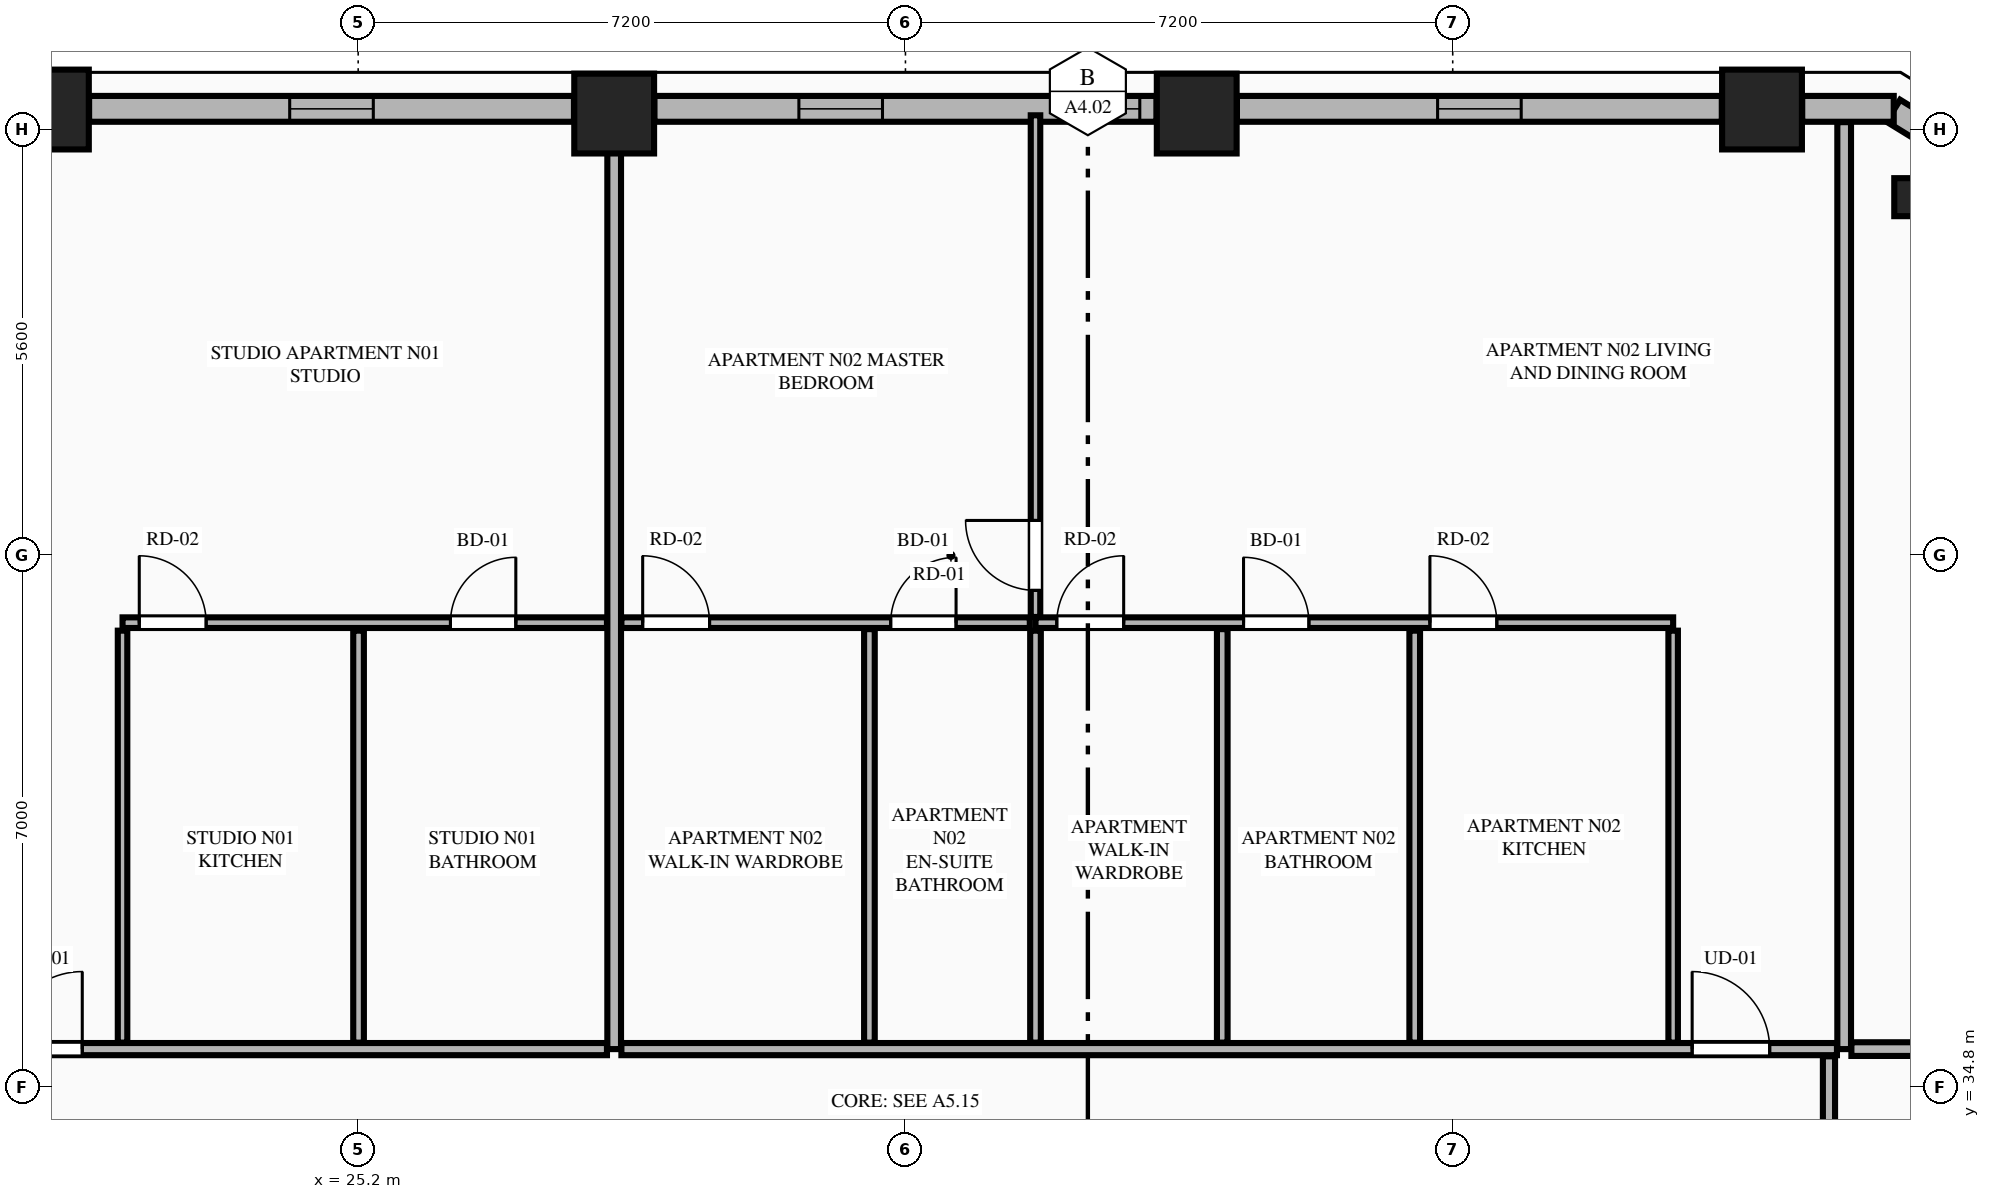
"""IFC4 building model, lengths in metres.
Left out: names, types, materials, properties, quantities, classifications, styles, units other than length and angle.
Written with IfcOpenShell. Run it as: python <this file> out.ifc"""

import sys

from ifc_helpers import new_model, si_unit, direction, frame, frame_2d, origin, origin_2d, place, context, subcontext, project, spatial, rectangle, extrude, element, fill, save


model = new_model("IFC4")
c1 = context("Model", 3, precision=1e-05, world=origin(), true_north=direction((0.0, 1.0)))
c2 = subcontext(c1, "Body", "Model", "MODEL_VIEW")
j1 = project(units=[si_unit("LENGTHUNIT", "METRE"), si_unit("PLANEANGLEUNIT", "RADIAN")], contexts=[c1])
p1 = place(None, origin())
s1 = spatial("IfcSite", under=j1, at=p1, CompositionType="ELEMENT")
p2 = place(p1, origin())
s2 = spatial("IfcBuilding", under=s1, at=p2, CompositionType="ELEMENT")
p3 = place(p2, frame((0.0, 0.0, 101.95)))
s3 = spatial("IfcBuildingStorey", under=s2, at=p3, CompositionType="ELEMENT", Elevation=101.95)
for number, where, z_axis, x_axis in (
    (1, (43.669, 47.661, 0.0), (0.0, 0.0, 1.0), (1.0, 0.0, 0.0)),
    (2, (36.232, 47.608, 0.0), (0.0, 0.0, 1.0), (1.0, 0.0, 0.0)),
    (3, (28.568, 47.608, 0.0), (0.0, 0.0, 1.0), (1.0, 0.0, 0.0)),
    (4, (21.131, 47.661, 0.0), (0.0, 0.0, 1.0), (1.0, 0.0, 0.0)),
):
    element("IfcColumn", number, at=place(p3, frame(where, z_axis=z_axis, x_axis=x_axis)), inside=s3, PredefinedType="COLUMN", context=c2, shape_type="SweptSolid", body=[
        extrude(rectangle(XDim=1.05, YDim=1.05, at=origin_2d()), origin(), (0.0, 0.0, 1.0), 3.55),
    ])
p4 = place(p3, frame((45.659, 46.508, 0.0), z_axis=(0.0, 0.0, 1.0), x_axis=(-0.865160173452, 0.501495637342, 0.0)))
e5 = element("IfcColumn", 5, at=p4, inside=s3, PredefinedType="PILASTER", context=c2, shape_type="SweptSolid", body=[
    extrude(rectangle(XDim=0.5, YDim=0.35, at=origin_2d()), origin(), (0.0, 0.0, 1.0), 3.55),
])
p5 = place(p3, frame((46.971, 46.677, 0.0), z_axis=(0.0, 0.0, 1.0), x_axis=(-0.851798915137, 0.523868884523, 0.0)))
e6 = element("IfcWall", 6, at=p5, inside=s3, PredefinedType="STANDARD", context=c2, shape_type="SweptSolid", body=[
    extrude(rectangle(XDim=1.848, YDim=0.34, at=frame_2d((0.924, 0.0))), origin(), (0.0, 0.0, 1.0), 3.34),
])
p6 = place(p3, frame((45.402, 47.67, 0.0), z_axis=(0.0, 0.0, 1.0), x_axis=(-1.0, 0.0, 0.0)))
e7 = element("IfcWall", 7, at=p6, inside=s3, PredefinedType="STANDARD", context=c2, shape_type="SweptSolid", body=[
    extrude(rectangle(XDim=1.204, YDim=0.34, at=frame_2d((0.602, 0.0))), origin(), (0.0, 0.0, 1.0), 3.34),
])
p7 = place(p3, frame((43.14, 47.67, 0.0), z_axis=(0.0, 0.0, 1.0), x_axis=(-1.0, 0.0, 0.0)))
e8 = element("IfcWall", 8, at=p7, inside=s3, PredefinedType="STANDARD", context=c2, shape_type="SweptSolid", body=[
    extrude(rectangle(XDim=6.379, YDim=0.34, at=frame_2d((3.189, 0.0))), origin(), (0.0, 0.0, 1.0), 2.797),
])
p8 = place(p7, frame((2.639, 0.0, 0.75)))
e9 = element("IfcOpeningElement", 9, at=p8, cuts=e8, PredefinedType="OPENING", context=c2, shape_type="SweptSolid", body=[
    extrude(rectangle(XDim=1.1, YDim=1.897, at=frame_2d((0.55, 0.948))), frame((0.0, 0.18, 0.0), z_axis=(0.0, -1.0, 0.0), x_axis=(1.0, 0.0, 0.0)), (0.0, 0.0, 1.0), 0.36),
])
p9 = place(p3, frame((35.703, 47.67, 0.0), z_axis=(0.0, 0.0, 1.0), x_axis=(-1.0, 0.0, 0.0)))
e10 = element("IfcWall", 10, at=p9, inside=s3, PredefinedType="STANDARD", context=c2, shape_type="SweptSolid", body=[
    extrude(rectangle(XDim=6.606, YDim=0.34, at=frame_2d((3.303, 0.0))), origin(), (0.0, 0.0, 1.0), 2.797),
])
p10 = place(p9, frame((0.22, 0.0, 0.75)))
e11 = element("IfcOpeningElement", 11, at=p10, cuts=e10, PredefinedType="OPENING", context=c2, shape_type="SweptSolid", body=[
    extrude(rectangle(XDim=1.04, YDim=1.897, at=frame_2d((0.52, 0.948))), frame((0.0, 0.18, 0.0), z_axis=(0.0, -1.0, 0.0), x_axis=(1.0, 0.0, 0.0)), (0.0, 0.0, 1.0), 0.36),
])
p11 = place(p9, frame((3.605, 0.0, 0.75)))
e12 = element("IfcOpeningElement", 12, at=p11, cuts=e10, PredefinedType="OPENING", context=c2, shape_type="SweptSolid", body=[
    extrude(rectangle(XDim=1.1, YDim=1.897, at=frame_2d((0.55, 0.948))), frame((0.0, 0.18, 0.0), z_axis=(0.0, -1.0, 0.0), x_axis=(1.0, 0.0, 0.0)), (0.0, 0.0, 1.0), 0.36),
])
p12 = place(p3, frame((28.039, 47.67, 0.0), z_axis=(0.0, 0.0, 1.0), x_axis=(-1.0, 0.0, 0.0)))
e13 = element("IfcWall", 13, at=p12, inside=s3, PredefinedType="STANDARD", context=c2, shape_type="SweptSolid", body=[
    extrude(rectangle(XDim=6.379, YDim=0.34, at=frame_2d((3.189, 0.0))), origin(), (0.0, 0.0, 1.0), 2.797),
])
p13 = place(p12, frame((2.64, 0.0, 0.75)))
e14 = element("IfcOpeningElement", 14, at=p13, cuts=e13, PredefinedType="OPENING", context=c2, shape_type="SweptSolid", body=[
    extrude(rectangle(XDim=1.1, YDim=1.897, at=frame_2d((0.55, 0.948))), frame((0.0, 0.18, 0.0), z_axis=(0.0, -1.0, 0.0), x_axis=(1.0, 0.0, 0.0)), (0.0, 0.0, 1.0), 0.36),
])
p14 = place(p3, frame((28.568, 35.3, 0.0), z_axis=(0.0, 0.0, 1.0), x_axis=(0.0, 1.0, 0.0)))
e15 = element("IfcWall", 15, at=p14, inside=s3, PredefinedType="PARTITIONING", context=c2, shape_type="SweptSolid", body=[
    extrude(rectangle(XDim=12.195, YDim=0.18, at=frame_2d((6.098, 0.0))), origin(), (0.0, 0.0, 1.0), 2.722),
])
p15 = place(p3, frame((44.75, 35.3, 0.0), z_axis=(0.0, 0.0, 1.0), x_axis=(0.0, 1.0, 0.0)))
e16 = element("IfcWall", 16, at=p15, inside=s3, PredefinedType="PARTITIONING", context=c2, shape_type="SweptSolid", body=[
    extrude(rectangle(XDim=12.195, YDim=0.18, at=frame_2d((6.098, 0.0))), origin(), (0.0, 0.0, 1.0), 3.34),
])
p16 = place(p3, frame((20.145, 35.3, 0.0), z_axis=(0.0, 0.0, 1.0), x_axis=(1.0, 0.0, 0.0)))
e17 = element("IfcWall", 17, at=p16, inside=s3, PredefinedType="PARTITIONING", context=c2, shape_type="SweptSolid", body=[
    extrude(rectangle(XDim=8.328, YDim=0.16, at=frame_2d((4.164, 0.0))), origin(), (0.0, 0.0, 1.0), 3.34),
])
p17 = place(p16, frame((0.405, 0.0, 0.0)))
e18 = element("IfcOpeningElement", 18, at=p17, cuts=e17, PredefinedType="OPENING", context=c2, shape_type="SweptSolid", body=[
    extrude(rectangle(XDim=1.02, YDim=2.25, at=frame_2d((0.51, 1.125))), frame((0.0, 0.09, 0.0), z_axis=(0.0, -1.0, 0.0), x_axis=(1.0, 0.0, 0.0)), (0.0, 0.0, 1.0), 0.18),
])
p18 = place(p3, frame((22.1, 35.385, 0.0), z_axis=(0.0, 0.0, 1.0), x_axis=(0.0, 1.0, 0.0)))
e19 = element("IfcWall", 19, at=p18, inside=s3, PredefinedType="PARTITIONING", context=c2, shape_type="SweptSolid", body=[
    extrude(rectangle(XDim=5.42, YDim=0.125, at=frame_2d((2.71, 0.0))), origin(), (0.0, 0.0, 1.0), 2.722),
])
p19 = place(p3, frame((22.1, 40.91, 0.0), z_axis=(0.0, 0.0, 1.0), x_axis=(1.0, 0.0, 0.0)))
e20 = element("IfcWall", 20, at=p19, inside=s3, PredefinedType="PLUMBINGWALL", context=c2, shape_type="SweptSolid", body=[
    extrude(rectangle(XDim=6.373, YDim=0.14, at=frame_2d((3.187, 0.0))), origin(), (0.0, 0.0, 1.0), 3.34),
])
p20 = place(p19, frame((4.314, 0.0, 0.0)))
e21 = element("IfcOpeningElement", 21, at=p20, cuts=e20, PredefinedType="OPENING", context=c2, shape_type="SweptSolid", body=[
    extrude(rectangle(XDim=0.86, YDim=2.1, at=frame_2d((0.43, 1.05))), frame((0.0, 0.08, 0.0), z_axis=(0.0, -1.0, 0.0), x_axis=(1.0, 0.0, 0.0)), (0.0, 0.0, 1.0), 0.16),
])
p21 = place(p19, frame((0.22, 0.0, 0.0)))
e22 = element("IfcOpeningElement", 22, at=p21, cuts=e20, PredefinedType="OPENING", context=c2, shape_type="SweptSolid", body=[
    extrude(rectangle(XDim=0.88, YDim=2.15, at=frame_2d((0.44, 1.075))), frame((0.0, 0.08, 0.0), z_axis=(0.0, -1.0, 0.0), x_axis=(1.0, 0.0, 0.0)), (0.0, 0.0, 1.0), 0.16),
])
p22 = place(p3, frame((25.205, 35.385, 0.0), z_axis=(0.0, 0.0, 1.0), x_axis=(0.0, 1.0, 0.0)))
e23 = element("IfcWall", 23, at=p22, inside=s3, PredefinedType="PLUMBINGWALL", context=c2, shape_type="SweptSolid", body=[
    extrude(rectangle(XDim=5.42, YDim=0.14, at=frame_2d((2.71, 0.0))), origin(), (0.0, 0.0, 1.0), 3.34),
])
p23 = place(p3, frame((28.663, 35.3, 0.0), z_axis=(0.0, 0.0, 1.0), x_axis=(1.0, 0.0, 0.0)))
e24 = element("IfcWall", 24, at=p23, inside=s3, PredefinedType="PARTITIONING", context=c2, shape_type="SweptSolid", body=[
    extrude(rectangle(XDim=15.992, YDim=0.16, at=frame_2d((7.996, 0.0))), origin(), (0.0, 0.0, 1.0), 3.34),
])
p24 = place(p23, frame((14.087, 0.0, 0.0)))
e25 = element("IfcOpeningElement", 25, at=p24, cuts=e24, PredefinedType="OPENING", context=c2, shape_type="SweptSolid", body=[
    extrude(rectangle(XDim=1.02, YDim=2.25, at=frame_2d((0.51, 1.125))), frame((0.0, 0.09, 0.0), z_axis=(0.0, -1.0, 0.0), x_axis=(1.0, 0.0, 0.0)), (0.0, 0.0, 1.0), 0.18),
])
p25 = place(p3, frame((42.5, 35.385, 0.0), z_axis=(0.0, 0.0, 1.0), x_axis=(0.0, 1.0, 0.0)))
e26 = element("IfcWall", 26, at=p25, inside=s3, PredefinedType="PARTITIONING", context=c2, shape_type="SweptSolid", body=[
    extrude(rectangle(XDim=5.42, YDim=0.125, at=frame_2d((2.71, 0.0))), origin(), (0.0, 0.0, 1.0), 2.722),
])
p26 = place(p3, frame((34.111, 40.91, 0.0), z_axis=(0.0, 0.0, 1.0), x_axis=(1.0, 0.0, 0.0)))
e27 = element("IfcWall", 27, at=p26, inside=s3, PredefinedType="PLUMBINGWALL", context=c2, shape_type="SweptSolid", body=[
    extrude(rectangle(XDim=8.389, YDim=0.14, at=frame_2d((4.194, 0.0))), origin(), (0.0, 0.0, 1.0), 3.34),
])
p27 = place(p26, frame((0.28, 0.0, 0.0)))
e28 = element("IfcOpeningElement", 28, at=p27, cuts=e27, PredefinedType="OPENING", context=c2, shape_type="SweptSolid", body=[
    extrude(rectangle(XDim=0.88, YDim=2.15, at=frame_2d((0.44, 1.075))), frame((0.0, 0.08, 0.0), z_axis=(0.0, -1.0, 0.0), x_axis=(1.0, 0.0, 0.0)), (0.0, 0.0, 1.0), 0.16),
])
p28 = place(p26, frame((2.737, 0.0, 0.0)))
e29 = element("IfcOpeningElement", 29, at=p28, cuts=e27, PredefinedType="OPENING", context=c2, shape_type="SweptSolid", body=[
    extrude(rectangle(XDim=0.86, YDim=2.1, at=frame_2d((0.43, 1.05))), frame((0.0, 0.08, 0.0), z_axis=(0.0, -1.0, 0.0), x_axis=(1.0, 0.0, 0.0)), (0.0, 0.0, 1.0), 0.16),
])
p29 = place(p26, frame((5.189, 0.0, 0.0)))
e30 = element("IfcOpeningElement", 30, at=p29, cuts=e27, PredefinedType="OPENING", context=c2, shape_type="SweptSolid", body=[
    extrude(rectangle(XDim=0.88, YDim=2.15, at=frame_2d((0.44, 1.075))), frame((0.0, 0.08, 0.0), z_axis=(0.0, -1.0, 0.0), x_axis=(1.0, 0.0, 0.0)), (0.0, 0.0, 1.0), 0.16),
])
p30 = place(p3, frame((28.663, 40.91, 0.0), z_axis=(0.0, 0.0, 1.0), x_axis=(1.0, 0.0, 0.0)))
e31 = element("IfcWall", 31, at=p30, inside=s3, PredefinedType="PLUMBINGWALL", context=c2, shape_type="SweptSolid", body=[
    extrude(rectangle(XDim=5.373, YDim=0.14, at=frame_2d((2.687, 0.0))), origin(), (0.0, 0.0, 1.0), 3.34),
])
p31 = place(p30, frame((0.28, 0.0, 0.0)))
e32 = element("IfcOpeningElement", 32, at=p31, cuts=e31, PredefinedType="OPENING", context=c2, shape_type="SweptSolid", body=[
    extrude(rectangle(XDim=0.88, YDim=2.15, at=frame_2d((0.44, 1.075))), frame((0.0, 0.08, 0.0), z_axis=(0.0, -1.0, 0.0), x_axis=(1.0, 0.0, 0.0)), (0.0, 0.0, 1.0), 0.16),
])
p32 = place(p30, frame((3.543, 0.0, 0.0)))
e33 = element("IfcOpeningElement", 33, at=p32, cuts=e31, PredefinedType="OPENING", context=c2, shape_type="SweptSolid", body=[
    extrude(rectangle(XDim=0.86, YDim=2.1, at=frame_2d((0.43, 1.05))), frame((0.0, 0.08, 0.0), z_axis=(0.0, -1.0, 0.0), x_axis=(1.0, 0.0, 0.0)), (0.0, 0.0, 1.0), 0.16),
])
for number, where, z_axis, x_axis in (
    (34, (39.1, 35.385, 0.0), (0.0, 0.0, 1.0), (0.0, 1.0, 0.0)),
    (35, (34.111, 35.385, 0.0), (0.0, 0.0, 1.0), (0.0, 1.0, 0.0)),
):
    element("IfcWall", number, at=place(p3, frame(where, z_axis=z_axis, x_axis=x_axis)), inside=s3, PredefinedType="PLUMBINGWALL", context=c2, shape_type="SweptSolid", body=[
        extrude(rectangle(XDim=5.42, YDim=0.14, at=frame_2d((2.71, 0.0))), origin(), (0.0, 0.0, 1.0), 3.34),
    ])
p33 = place(p3, frame((34.111, 40.985, 0.0), z_axis=(0.0, 0.0, 1.0), x_axis=(0.0, 1.0, 0.0)))
e36 = element("IfcWall", 36, at=p33, inside=s3, PredefinedType="PARTITIONING", context=c2, shape_type="SweptSolid", body=[
    extrude(rectangle(XDim=6.6, YDim=0.125, at=frame_2d((3.3, 0.0))), origin(), (0.0, 0.0, 1.0), 3.34),
])
p34 = place(p33, frame((0.35, 0.0, 0.0)))
e37 = element("IfcOpeningElement", 37, at=p34, cuts=e36, PredefinedType="OPENING", context=c2, shape_type="SweptSolid", body=[
    extrude(rectangle(XDim=0.92, YDim=2.15, at=frame_2d((0.46, 1.075))), frame((0.0, 0.073, 0.0), z_axis=(0.0, -1.0, 0.0), x_axis=(1.0, 0.0, 0.0)), (0.0, 0.0, 1.0), 0.145),
])
for number, where, z_axis, x_axis in (
    (38, (36.568, 35.385, 0.0), (0.0, 0.0, 1.0), (0.0, 1.0, 0.0)),
    (39, (31.926, 35.385, 0.0), (0.0, 0.0, 1.0), (0.0, 1.0, 0.0)),
):
    element("IfcWall", number, at=place(p3, frame(where, z_axis=z_axis, x_axis=x_axis)), inside=s3, PredefinedType="PLUMBINGWALL", context=c2, shape_type="SweptSolid", body=[
        extrude(rectangle(XDim=5.44, YDim=0.14, at=frame_2d((2.72, 0.0))), origin(), (0.0, 0.0, 1.0), 3.34),
    ])
p35 = place(p3, frame((44.845, 35.3, 0.0), z_axis=(0.0, 0.0, 1.0), x_axis=(1.0, 0.0, 0.0)))
e40 = element("IfcWall", 40, at=p35, inside=s3, PredefinedType="PARTITIONING", context=c2, shape_type="SweptSolid", body=[
    extrude(rectangle(XDim=7.669, YDim=0.18, at=frame_2d((3.834, 0.0))), origin(), (0.0, 0.0, 1.0), 3.34),
])
p36 = place(p3, frame((44.55, 26.371, 0.0), z_axis=(0.0, 0.0, 1.0), x_axis=(0.0, 1.0, 0.0)))
e41 = element("IfcWall", 41, at=p36, inside=s3, PredefinedType="PARTITIONING", context=c2, shape_type="SweptSolid", body=[
    extrude(rectangle(XDim=8.834, YDim=0.16, at=frame_2d((4.417, 0.0))), origin(), (0.0, 0.0, 1.0), 3.34),
])
p37 = place(p36, frame((0.45, 0.0, 0.0)))
e42 = element("IfcOpeningElement", 42, at=p37, cuts=e41, PredefinedType="OPENING", context=c2, shape_type="SweptSolid", body=[
    extrude(rectangle(XDim=1.02, YDim=2.25, at=frame_2d((0.51, 1.125))), frame((0.0, 0.09, 0.0), z_axis=(0.0, -1.0, 0.0), x_axis=(1.0, 0.0, 0.0)), (0.0, 0.0, 1.0), 0.18),
])
p38 = place(p8, origin())
e43 = element("IfcWindow", 43, at=p38, inside=s3, PartitioningType="SINGLE_PANEL", PredefinedType="WINDOW", context=c2, shape_type="SweptSolid", body=[
    extrude(rectangle(XDim=1.1, YDim=1.897, at=frame_2d((0.55, 0.948))), frame((0.0, 0.03, 0.0), z_axis=(0.0, -1.0, 0.0), x_axis=(1.0, 0.0, 0.0)), (0.0, 0.0, 1.0), 0.06),
])
fill(e9, e43)
p39 = place(p10, origin())
e44 = element("IfcWindow", 44, at=p39, inside=s3, PartitioningType="SINGLE_PANEL", PredefinedType="WINDOW", context=c2, shape_type="SweptSolid", body=[
    extrude(rectangle(XDim=1.04, YDim=1.897, at=frame_2d((0.52, 0.948))), frame((0.0, 0.03, 0.0), z_axis=(0.0, -1.0, 0.0), x_axis=(1.0, 0.0, 0.0)), (0.0, 0.0, 1.0), 0.06),
])
fill(e11, e44)
p40 = place(p13, origin())
e45 = element("IfcWindow", 45, at=p40, inside=s3, PartitioningType="SINGLE_PANEL", PredefinedType="WINDOW", context=c2, shape_type="SweptSolid", body=[
    extrude(rectangle(XDim=1.1, YDim=1.897, at=frame_2d((0.55, 0.948))), frame((0.0, 0.03, 0.0), z_axis=(0.0, -1.0, 0.0), x_axis=(1.0, 0.0, 0.0)), (0.0, 0.0, 1.0), 0.06),
])
fill(e14, e45)
p41 = place(p20, origin())
e46 = element("IfcDoor", 46, at=p41, inside=s3, OperationType="SINGLE_SWING_RIGHT", PredefinedType="DOOR", context=c2, shape_type="SweptSolid", body=[
    extrude(rectangle(XDim=0.86, YDim=2.1, at=frame_2d((0.43, 1.05))), frame((0.0, 0.025, 0.0), z_axis=(0.0, -1.0, 0.0), x_axis=(1.0, 0.0, 0.0)), (0.0, 0.0, 1.0), 0.05),
])
fill(e21, e46)
p42 = place(p17, origin())
e47 = element("IfcDoor", 47, at=p42, inside=s3, OperationType="SINGLE_SWING_RIGHT", PredefinedType="DOOR", context=c2, shape_type="SweptSolid", body=[
    extrude(rectangle(XDim=1.02, YDim=2.25, at=frame_2d((0.51, 1.125))), frame((0.0, 0.025, 0.0), z_axis=(0.0, -1.0, 0.0), x_axis=(1.0, 0.0, 0.0)), (0.0, 0.0, 1.0), 0.05),
])
fill(e18, e47)
p43 = place(p21, origin())
e48 = element("IfcDoor", 48, at=p43, inside=s3, OperationType="SINGLE_SWING_LEFT", PredefinedType="DOOR", context=c2, shape_type="SweptSolid", body=[
    extrude(rectangle(XDim=0.88, YDim=2.15, at=frame_2d((0.44, 1.075))), frame((0.0, 0.025, 0.0), z_axis=(0.0, -1.0, 0.0), x_axis=(1.0, 0.0, 0.0)), (0.0, 0.0, 1.0), 0.05),
])
fill(e22, e48)
p44 = place(p27, origin())
e49 = element("IfcDoor", 49, at=p44, inside=s3, OperationType="SINGLE_SWING_RIGHT", PredefinedType="DOOR", context=c2, shape_type="SweptSolid", body=[
    extrude(rectangle(XDim=0.88, YDim=2.15, at=frame_2d((0.44, 1.075))), frame((0.0, 0.025, 0.0), z_axis=(0.0, -1.0, 0.0), x_axis=(1.0, 0.0, 0.0)), (0.0, 0.0, 1.0), 0.05),
])
fill(e28, e49)
p45 = place(p28, origin())
e50 = element("IfcDoor", 50, at=p45, inside=s3, OperationType="SINGLE_SWING_LEFT", PredefinedType="DOOR", context=c2, shape_type="SweptSolid", body=[
    extrude(rectangle(XDim=0.86, YDim=2.1, at=frame_2d((0.43, 1.05))), frame((0.0, 0.025, 0.0), z_axis=(0.0, -1.0, 0.0), x_axis=(1.0, 0.0, 0.0)), (0.0, 0.0, 1.0), 0.05),
])
fill(e29, e50)
p46 = place(p31, origin())
e51 = element("IfcDoor", 51, at=p46, inside=s3, OperationType="SINGLE_SWING_LEFT", PredefinedType="DOOR", context=c2, shape_type="SweptSolid", body=[
    extrude(rectangle(XDim=0.88, YDim=2.15, at=frame_2d((0.44, 1.075))), frame((0.0, 0.025, 0.0), z_axis=(0.0, -1.0, 0.0), x_axis=(1.0, 0.0, 0.0)), (0.0, 0.0, 1.0), 0.05),
])
fill(e32, e51)
p47 = place(p32, origin())
e52 = element("IfcDoor", 52, at=p47, inside=s3, OperationType="SINGLE_SWING_RIGHT", PredefinedType="DOOR", context=c2, shape_type="SweptSolid", body=[
    extrude(rectangle(XDim=0.86, YDim=2.1, at=frame_2d((0.43, 1.05))), frame((0.0, 0.025, 0.0), z_axis=(0.0, -1.0, 0.0), x_axis=(1.0, 0.0, 0.0)), (0.0, 0.0, 1.0), 0.05),
])
fill(e33, e52)
p48 = place(p24, origin())
e53 = element("IfcDoor", 53, at=p48, inside=s3, OperationType="SINGLE_SWING_LEFT", PredefinedType="DOOR", context=c2, shape_type="SweptSolid", body=[
    extrude(rectangle(XDim=1.02, YDim=2.25, at=frame_2d((0.51, 1.125))), frame((0.0, 0.025, 0.0), z_axis=(0.0, -1.0, 0.0), x_axis=(1.0, 0.0, 0.0)), (0.0, 0.0, 1.0), 0.05),
])
fill(e25, e53)
p49 = place(p29, origin())
e54 = element("IfcDoor", 54, at=p49, inside=s3, OperationType="SINGLE_SWING_LEFT", PredefinedType="DOOR", context=c2, shape_type="SweptSolid", body=[
    extrude(rectangle(XDim=0.88, YDim=2.15, at=frame_2d((0.44, 1.075))), frame((0.0, 0.025, 0.0), z_axis=(0.0, -1.0, 0.0), x_axis=(1.0, 0.0, 0.0)), (0.0, 0.0, 1.0), 0.05),
])
fill(e30, e54)
p50 = place(p34, origin())
e55 = element("IfcDoor", 55, at=p50, inside=s3, OperationType="SINGLE_SWING_RIGHT", PredefinedType="DOOR", context=c2, shape_type="SweptSolid", body=[
    extrude(rectangle(XDim=0.92, YDim=2.15, at=frame_2d((0.46, 1.075))), frame((0.0, 0.025, 0.0), z_axis=(0.0, -1.0, 0.0), x_axis=(1.0, 0.0, 0.0)), (0.0, 0.0, 1.0), 0.05),
])
fill(e37, e55)
p51 = place(p11, origin())
e56 = element("IfcWindow", 56, at=p51, inside=s3, PartitioningType="SINGLE_PANEL", PredefinedType="WINDOW", context=c2, shape_type="SweptSolid", body=[
    extrude(rectangle(XDim=1.1, YDim=1.897, at=frame_2d((0.55, 0.948))), frame((0.0, 0.03, 0.0), z_axis=(0.0, -1.0, 0.0), x_axis=(1.0, 0.0, 0.0)), (0.0, 0.0, 1.0), 0.06),
])
fill(e12, e56)
save(model, sys.argv[1])
